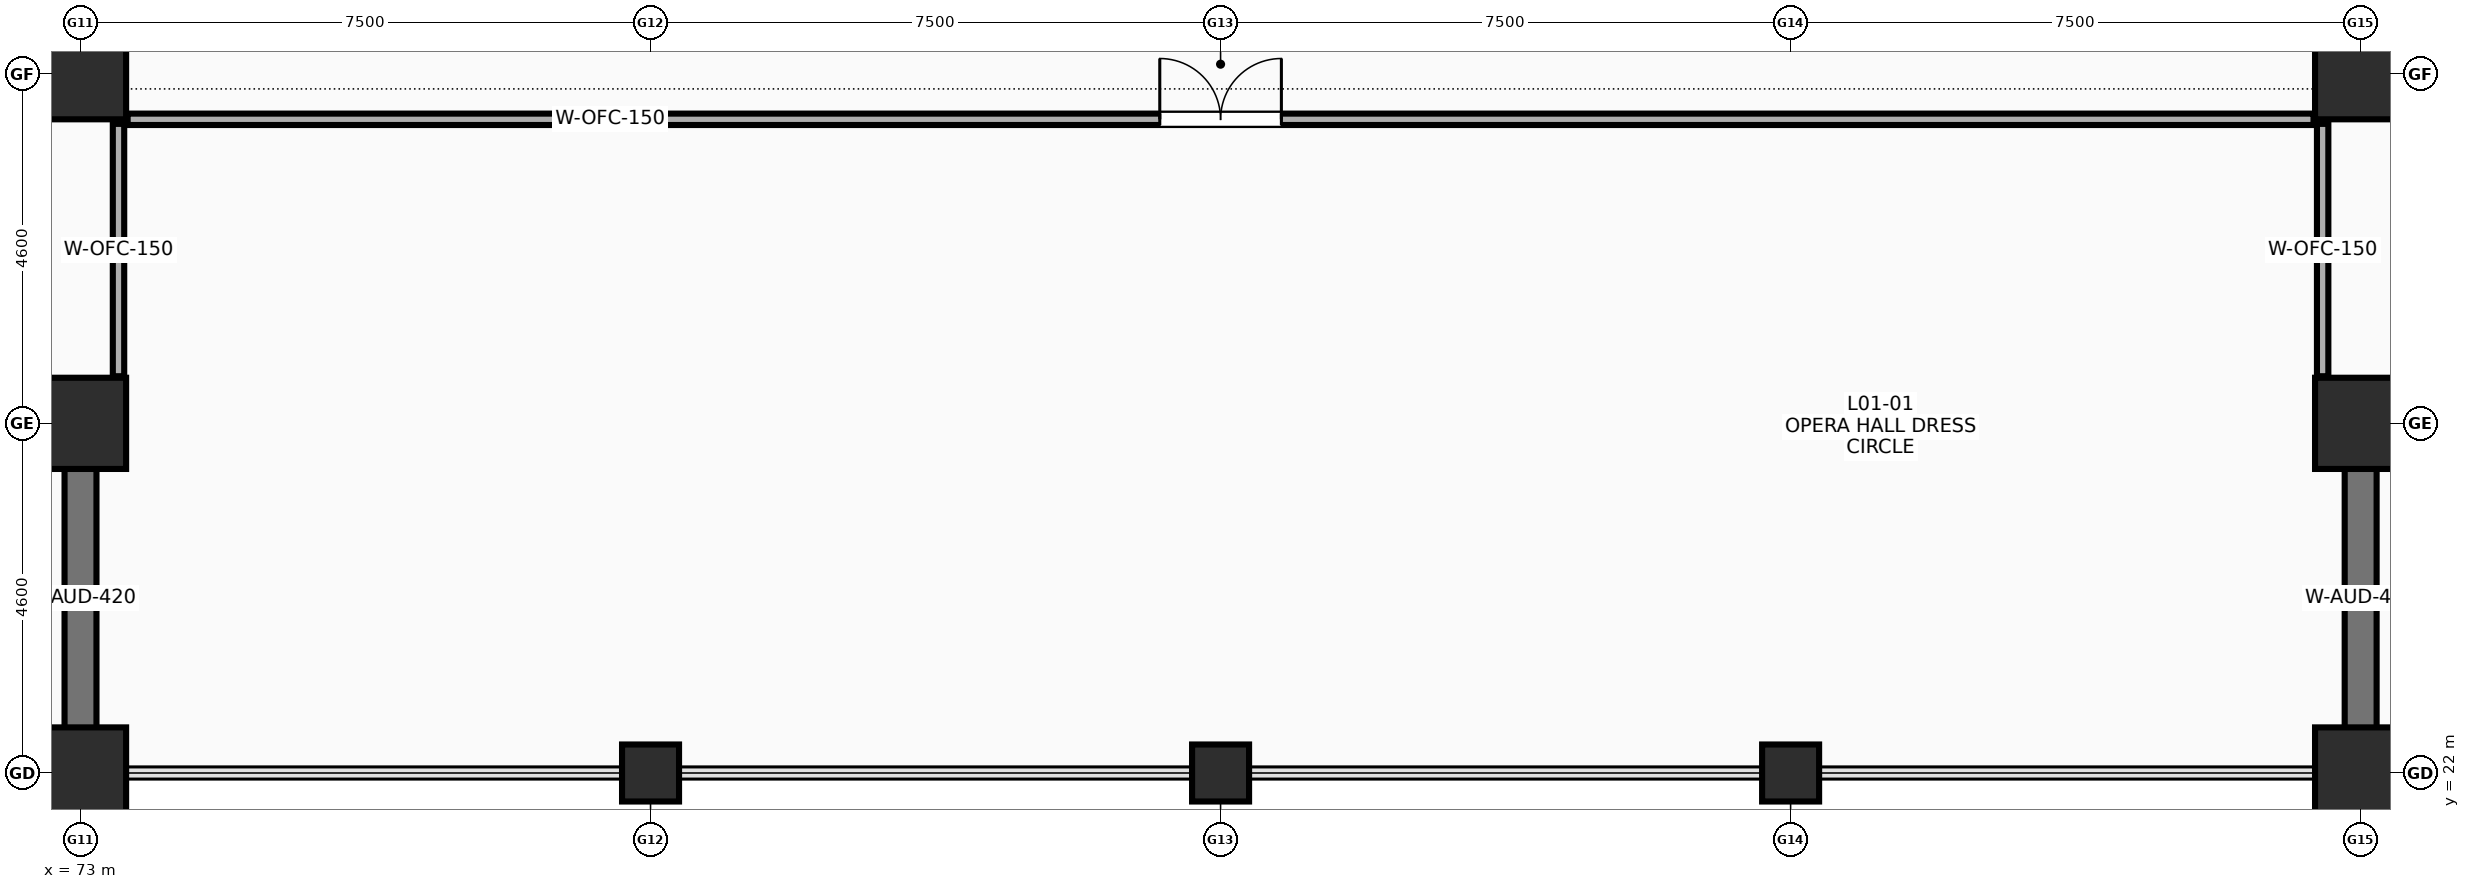
"""IFC4 building model, lengths in metres.
Left out: names, types, materials, properties, quantities, classifications, styles, units other than length and angle.
Written with IfcOpenShell. Run it as: python <this file> out.ifc"""

import sys

from ifc_helpers import new_model, si_unit, direction, frame, frame_2d, origin, origin_2d, place, context, subcontext, project, spatial, rectangle, extrude, element, fill, save


model = new_model("IFC4")
c1 = context("Model", 3, precision=1e-05, world=origin(), true_north=direction((0.0, 1.0)))
c2 = subcontext(c1, "Body", "Model", "MODEL_VIEW")
j1 = project(units=[si_unit("LENGTHUNIT", "METRE"), si_unit("PLANEANGLEUNIT", "RADIAN")], contexts=[c1])
p1 = place(None, origin())
s1 = spatial("IfcSite", under=j1, at=p1, CompositionType="ELEMENT")
p2 = place(p1, origin())
s2 = spatial("IfcBuilding", under=s1, at=p2, CompositionType="ELEMENT")
p3 = place(p2, frame((0.0, 0.0, 5.4)))
s3 = spatial("IfcBuildingStorey", under=s2, at=p3, CompositionType="ELEMENT", Elevation=5.4)
for number, where, z_axis, x_axis in (
    (1, (73.0, 22.0, 0.0), (0.0, 0.0, 1.0), (1.0, 0.0, 0.0)),
    (2, (73.0, 26.6, 0.0), (0.0, 0.0, 1.0), (1.0, 0.0, 0.0)),
    (3, (73.0, 31.2, 0.0), (0.0, 0.0, 1.0), (1.0, 0.0, 0.0)),
):
    element("IfcColumn", number, at=place(p3, frame(where, z_axis=z_axis, x_axis=x_axis)), inside=s3, PredefinedType="COLUMN", context=c2, shape_type="SweptSolid", body=[
        extrude(rectangle(XDim=1.2, YDim=1.2, at=origin_2d()), origin(), (0.0, 0.0, 1.0), 4.4),
    ])
for number, where, z_axis, x_axis in (
    (4, (80.5, 22.0, 0.0), (0.0, 0.0, 1.0), (1.0, 0.0, 0.0)),
    (5, (88.0, 22.0, 0.0), (0.0, 0.0, 1.0), (1.0, 0.0, 0.0)),
    (6, (95.5, 22.0, 0.0), (0.0, 0.0, 1.0), (1.0, 0.0, 0.0)),
):
    element("IfcColumn", number, at=place(p3, frame(where, z_axis=z_axis, x_axis=x_axis)), inside=s3, PredefinedType="COLUMN", context=c2, shape_type="SweptSolid", body=[
        extrude(rectangle(XDim=0.75, YDim=0.75, at=origin_2d()), origin(), (0.0, 0.0, 1.0), 4.4),
    ])
for number, where, z_axis, x_axis in (
    (7, (103.0, 22.0, 0.0), (0.0, 0.0, 1.0), (1.0, 0.0, 0.0)),
    (8, (103.0, 26.6, 0.0), (0.0, 0.0, 1.0), (1.0, 0.0, 0.0)),
    (9, (103.0, 31.2, 0.0), (0.0, 0.0, 1.0), (1.0, 0.0, 0.0)),
):
    element("IfcColumn", number, at=place(p3, frame(where, z_axis=z_axis, x_axis=x_axis)), inside=s3, PredefinedType="COLUMN", context=c2, shape_type="SweptSolid", body=[
        extrude(rectangle(XDim=1.2, YDim=1.2, at=origin_2d()), origin(), (0.0, 0.0, 1.0), 4.4),
    ])
for number, where, z_axis, x_axis in (
    (10, (73.0, 22.59, 0.0), (0.0, 0.0, 1.0), (0.0, 1.0, 0.0)),
    (11, (103.0, 22.59, 0.0), (0.0, 0.0, 1.0), (0.0, 1.0, 0.0)),
):
    element("IfcWall", number, at=place(p3, frame(where, z_axis=z_axis, x_axis=x_axis)), inside=s3, PredefinedType="SHEAR", context=c2, shape_type="SweptSolid", body=[
        extrude(rectangle(XDim=3.42, YDim=0.42, at=frame_2d((1.71, 0.0))), origin(), (0.0, 0.0, 1.0), 4.4),
    ])
p4 = place(p3, frame((73.62, 30.6, 0.0), z_axis=(0.0, 0.0, 1.0), x_axis=(1.0, 0.0, 0.0)))
e12 = element("IfcWall", 12, at=p4, inside=s3, PredefinedType="PARTITIONING", context=c2, shape_type="SweptSolid", body=[
    extrude(rectangle(XDim=28.76, YDim=0.15, at=frame_2d((14.38, 0.0))), origin(), (0.0, 0.0, 1.0), 4.02),
])
p5 = place(p4, frame((13.58, 0.0, 0.0)))
e13 = element("IfcOpeningElement", 13, at=p5, cuts=e12, PredefinedType="OPENING", context=c2, shape_type="SweptSolid", body=[
    extrude(rectangle(XDim=1.6, YDim=2.25, at=frame_2d((0.8, 1.125))), frame((0.0, 0.085, 0.0), z_axis=(0.0, -1.0, 0.0), x_axis=(1.0, 0.0, 0.0)), (0.0, 0.0, 1.0), 0.17),
])
for number, where, z_axis, x_axis in (
    (14, (73.5, 27.22, 0.0), (0.0, 0.0, 1.0), (0.0, 1.0, 0.0)),
    (15, (102.5, 27.22, 0.0), (0.0, 0.0, 1.0), (0.0, 1.0, 0.0)),
):
    element("IfcWall", number, at=place(p3, frame(where, z_axis=z_axis, x_axis=x_axis)), inside=s3, PredefinedType="PARTITIONING", context=c2, shape_type="SweptSolid", body=[
        extrude(rectangle(XDim=3.32, YDim=0.15, at=frame_2d((1.66, 0.0))), origin(), (0.0, 0.0, 1.0), 4.02),
    ])
p6 = place(p5, origin())
e16 = element("IfcDoor", 16, at=p6, inside=s3, OperationType="DOUBLE_DOOR_SINGLE_SWING", PredefinedType="DOOR", context=c2, shape_type="SweptSolid", body=[
    extrude(rectangle(XDim=1.6, YDim=2.25, at=frame_2d((0.8, 1.125))), frame((0.0, 0.025, 0.0), z_axis=(0.0, -1.0, 0.0), x_axis=(1.0, 0.0, 0.0)), (0.0, 0.0, 1.0), 0.05),
])
fill(e13, e16)
save(model, sys.argv[1])
